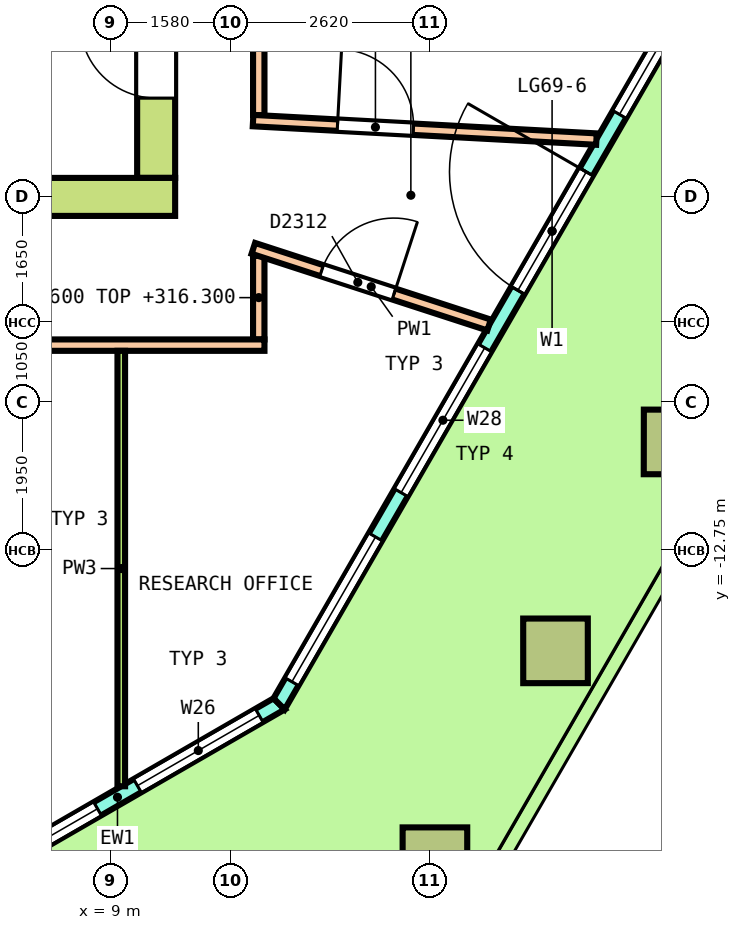
"""IFC4 building model, lengths in metres.
Left out: names, types, materials, properties, quantities, classifications, styles, units other than length and angle.
Written with IfcOpenShell. Run it as: python <this file> out.ifc"""

import sys

from ifc_helpers import new_model, si_unit, direction, frame, frame_2d, origin, origin_2d, place, context, subcontext, project, spatial, polyline, rectangle, outline, extrude, element, fill, save


model = new_model("IFC4")
c1 = context("Model", 3, precision=1e-05, world=origin(), true_north=direction((0.0, 1.0)))
c2 = subcontext(c1, "Body", "Model", "MODEL_VIEW")
j1 = project(units=[si_unit("LENGTHUNIT", "METRE"), si_unit("PLANEANGLEUNIT", "RADIAN")], contexts=[c1])
p1 = place(None, origin())
s1 = spatial("IfcSite", under=j1, at=p1, CompositionType="ELEMENT")
p2 = place(p1, origin())
s2 = spatial("IfcBuilding", under=s1, at=p2, CompositionType="ELEMENT")
p3 = place(p2, frame((0.0, 0.0, 312.6)))
s3 = spatial("IfcBuildingStorey", under=s2, at=p3, CompositionType="ELEMENT", Elevation=312.6)
p4 = place(p3, frame((13.268, -16.82, 0.0), z_axis=(-0.018115165867, -0.031417446337, 0.999342176049), x_axis=(0.499040470376, 0.865819492615, 0.036265894916)))
e1 = element("IfcColumn", 1, at=p4, inside=s3, PredefinedType="COLUMN", context=c2, shape_type="SweptSolid", body=[
    extrude(rectangle(XDim=0.85, YDim=0.85, at=origin_2d()), origin(), (0.0, 0.0, 1.0), 3.652),
])
p5 = place(p3, frame((14.854, -14.072, 0.0), z_axis=(-0.010900423214, -0.018858400897, 0.999762742599), x_axis=(0.499728924135, 0.865907930491, 0.021782063614)))
e2 = element("IfcColumn", 2, at=p5, inside=s3, PredefinedType="COLUMN", context=c2, shape_type="SweptSolid", body=[
    extrude(rectangle(XDim=0.85, YDim=0.85, at=origin_2d()), origin(), (0.0, 0.0, 1.0), 3.651),
])
p6 = place(p3, frame((16.441, -11.324, 0.0), z_axis=(-0.003611945175, -0.00628746012, 0.999973710503), x_axis=(0.499382072477, 0.866351526517, 0.007251081967)))
e3 = element("IfcColumn", 3, at=p6, inside=s3, PredefinedType="COLUMN", context=c2, shape_type="SweptSolid", body=[
    extrude(rectangle(XDim=0.85, YDim=0.85, at=origin_2d()), origin(), (0.0, 0.0, 1.0), 3.65),
])
p7 = place(p3, frame((6.964, -17.226, 0.0), z_axis=(0.0, 0.0, 1.0), x_axis=(0.866050666145, 0.499956241755, 0.0)))
e4 = element("IfcWall", 4, at=p7, inside=s3, PredefinedType="SOLIDWALL", context=c2, shape_type="SweptSolid", body=[
    extrude(outline(polyline([(-0.027, -0.1), (1.214, -0.1), (2.456, -0.1), (3.697, -0.1), (4.938, -0.1), (4.885, 0.1), (3.67, 0.1), (2.456, 0.1), (1.241, 0.1), (0.027, 0.1), (-0.027, -0.1)])), origin(), (0.0, 0.0, 1.0), 3.7),
])
p8 = place(p7, frame((0.303, 0.0, 0.1)))
e5 = element("IfcOpeningElement", 5, at=p8, cuts=e4, PredefinedType="OPENING", context=c2, shape_type="SweptSolid", body=[
    extrude(rectangle(XDim=1.85, YDim=2.9, at=frame_2d((0.925, 1.45))), frame((0.0, 0.11, 0.0), z_axis=(0.0, -1.0, 0.0), x_axis=(1.0, 0.0, 0.0)), (0.0, 0.0, 1.0), 0.22),
])
p9 = place(p7, frame((2.759, 0.0, 0.1)))
e6 = element("IfcOpeningElement", 6, at=p9, cuts=e4, PredefinedType="OPENING", context=c2, shape_type="SweptSolid", body=[
    extrude(rectangle(XDim=1.85, YDim=2.9, at=frame_2d((0.925, 1.45))), frame((0.0, 0.11, 0.0), z_axis=(0.0, -1.0, 0.0), x_axis=(1.0, 0.0, 0.0)), (0.0, 0.0, 1.0), 0.22),
])
p10 = place(p3, frame((11.218, -14.77, 0.0), z_axis=(0.0, 0.0, 1.0), x_axis=(0.499996104244, 0.866027652989, 0.0)))
e7 = element("IfcWall", 7, at=p10, inside=s3, PredefinedType="SOLIDWALL", context=c2, shape_type="SweptSolid", body=[
    extrude(outline(polyline([(-0.027, -0.1), (1.003, -0.1), (2.033, -0.1), (3.063, -0.1), (4.093, -0.1), (5.122, -0.1), (6.152, -0.1), (7.182, -0.1), (8.212, -0.1), (9.242, -0.1), (10.272, -0.1), (11.302, -0.1), (12.331, -0.1), (13.361, -0.1), (14.391, -0.1), (14.337, 0.1), (13.315, 0.1), (12.293, 0.1), (11.271, 0.1), (10.249, 0.1), (9.227, 0.1), (8.204, 0.1), (7.182, 0.1), (6.16, 0.1), (5.138, 0.1), (4.115, 0.1), (3.094, 0.1), (2.071, 0.1), (1.049, 0.1), (0.027, 0.1), (-0.027, -0.1)])), origin(), (0.0, 0.0, 1.0), 3.7),
])
p11 = place(p10, frame((0.336, 0.0, 0.1)))
e8 = element("IfcOpeningElement", 8, at=p11, cuts=e7, PredefinedType="OPENING", context=c2, shape_type="SweptSolid", body=[
    extrude(rectangle(XDim=2.2, YDim=2.9, at=frame_2d((1.1, 1.45))), frame((0.0, 0.11, 0.0), z_axis=(0.0, -1.0, 0.0), x_axis=(1.0, 0.0, 0.0)), (0.0, 0.0, 1.0), 0.22),
])
p12 = place(p10, frame((3.209, 0.0, 0.1)))
e9 = element("IfcOpeningElement", 9, at=p12, cuts=e7, PredefinedType="OPENING", context=c2, shape_type="SweptSolid", body=[
    extrude(rectangle(XDim=2.2, YDim=2.9, at=frame_2d((1.1, 1.45))), frame((0.0, 0.11, 0.0), z_axis=(0.0, -1.0, 0.0), x_axis=(1.0, 0.0, 0.0)), (0.0, 0.0, 1.0), 0.22),
])
p13 = place(p10, frame((6.282, 0.0, 0.0)))
e10 = element("IfcOpeningElement", 10, at=p13, cuts=e7, PredefinedType="OPENING", context=c2, shape_type="SweptSolid", body=[
    extrude(rectangle(XDim=1.8, YDim=2.4, at=frame_2d((0.9, 1.2))), frame((0.0, 0.11, 0.0), z_axis=(0.0, -1.0, 0.0), x_axis=(1.0, 0.0, 0.0)), (0.0, 0.0, 1.0), 0.22),
])
p14 = place(p10, frame((6.282, 0.0, 2.55)))
e11 = element("IfcOpeningElement", 11, at=p14, cuts=e7, PredefinedType="OPENING", context=c2, shape_type="SweptSolid", body=[
    extrude(rectangle(XDim=1.8, YDim=0.45, at=frame_2d((0.9, 0.225))), frame((0.0, 0.11, 0.0), z_axis=(0.0, -1.0, 0.0), x_axis=(1.0, 0.0, 0.0)), (0.0, 0.0, 1.0), 0.22),
])
p15 = place(p10, frame((8.955, 0.0, 0.1)))
e12 = element("IfcOpeningElement", 12, at=p15, cuts=e7, PredefinedType="OPENING", context=c2, shape_type="SweptSolid", body=[
    extrude(rectangle(XDim=2.2, YDim=2.9, at=frame_2d((1.1, 1.45))), frame((0.0, 0.11, 0.0), z_axis=(0.0, -1.0, 0.0), x_axis=(1.0, 0.0, 0.0)), (0.0, 0.0, 1.0), 0.22),
])
p16 = place(p10, frame((11.828, 0.0, 0.1)))
e13 = element("IfcOpeningElement", 13, at=p16, cuts=e7, PredefinedType="OPENING", context=c2, shape_type="SweptSolid", body=[
    extrude(rectangle(XDim=2.2, YDim=2.9, at=frame_2d((1.1, 1.45))), frame((0.0, 0.11, 0.0), z_axis=(0.0, -1.0, 0.0), x_axis=(1.0, 0.0, 0.0)), (0.0, 0.0, 1.0), 0.22),
])
p17 = place(p3, frame((-9.85, -8.1, 0.0), z_axis=(0.0, 0.0, 1.0), x_axis=(1.0, 0.0, 0.0)))
e14 = element("IfcWall", 14, at=p17, inside=s3, PredefinedType="SHEAR", context=c2, shape_type="SweptSolid", body=[
    extrude(rectangle(XDim=19.7, YDim=0.5, at=frame_2d((9.85, 0.0))), origin(), (0.0, 0.0, 1.0), 3.7),
])
p18 = place(p17, frame((11.4, 0.0, 0.0)))
e15 = element("IfcOpeningElement", 15, at=p18, cuts=e14, PredefinedType="OPENING", context=c2, shape_type="SweptSolid", body=[
    extrude(rectangle(XDim=1.2, YDim=2.1, at=frame_2d((0.6, 1.05))), frame((0.0, 0.26, 0.0), z_axis=(0.0, -1.0, 0.0), x_axis=(1.0, 0.0, 0.0)), (0.0, 0.0, 1.0), 0.52),
])
p19 = place(p3, frame((9.6, -7.85, 0.0), z_axis=(0.0, 0.0, 1.0), x_axis=(0.0, 1.0, 0.0)))
e16 = element("IfcWall", 16, at=p19, inside=s3, PredefinedType="SHEAR", context=c2, shape_type="SweptSolid", body=[
    extrude(rectangle(XDim=15.7, YDim=0.5, at=frame_2d((7.85, 0.0))), origin(), (0.0, 0.0, 1.0), 3.7),
])
p20 = place(p19, frame((6.65, 0.0, 0.0)))
e17 = element("IfcOpeningElement", 17, at=p20, cuts=e16, PredefinedType="OPENING", context=c2, shape_type="SweptSolid", body=[
    extrude(rectangle(XDim=2.4, YDim=2.1, at=frame_2d((1.2, 1.05))), frame((0.0, 0.26, 0.0), z_axis=(0.0, -1.0, 0.0), x_axis=(1.0, 0.0, 0.0)), (0.0, 0.0, 1.0), 0.52),
])
p21 = place(p19, frame((13.55, 0.0, 0.0)))
e18 = element("IfcOpeningElement", 18, at=p21, cuts=e16, PredefinedType="OPENING", context=c2, shape_type="SweptSolid", body=[
    extrude(rectangle(XDim=1.2, YDim=2.1, at=frame_2d((0.6, 1.05))), frame((0.0, 0.26, 0.0), z_axis=(0.0, -1.0, 0.0), x_axis=(1.0, 0.0, 0.0)), (0.0, 0.0, 1.0), 0.52),
])
p22 = place(p19, frame((1.05, 0.0, 0.0)))
e19 = element("IfcOpeningElement", 19, at=p22, cuts=e16, PredefinedType="OPENING", context=c2, shape_type="SweptSolid", body=[
    extrude(rectangle(XDim=1.0, YDim=2.1, at=frame_2d((0.5, 1.05))), frame((0.0, 0.26, 0.0), z_axis=(0.0, -1.0, 0.0), x_axis=(1.0, 0.0, 0.0)), (0.0, 0.0, 1.0), 0.52),
])
p23 = place(p3, frame((10.95, -9.975, 0.0), z_axis=(0.0, 0.0, 1.0), x_axis=(0.0, 1.0, 0.0)))
e20 = element("IfcWall", 20, at=p23, inside=s3, PredefinedType="PARTITIONING", context=c2, shape_type="SweptSolid", body=[
    extrude(rectangle(XDim=1.1, YDim=0.15, at=frame_2d((0.55, 0.0))), origin(), (0.0, 0.0, 1.0), 3.7),
])
p24 = place(p3, frame((10.95, -7.025, 0.0), z_axis=(0.0, 0.0, 1.0), x_axis=(0.0, 1.0, 0.0)))
e21 = element("IfcWall", 21, at=p24, inside=s3, PredefinedType="PARTITIONING", context=c2, shape_type="SweptSolid", body=[
    extrude(rectangle(XDim=17.0, YDim=0.15, at=frame_2d((8.5, 0.0))), origin(), (0.0, 0.0, 1.0), 3.05),
])
p25 = place(p24, frame((7.892, 0.0, 0.0)))
e22 = element("IfcOpeningElement", 22, at=p25, cuts=e21, PredefinedType="OPENING", context=c2, shape_type="SweptSolid", body=[
    extrude(rectangle(XDim=1.0, YDim=2.1, at=frame_2d((0.5, 1.05))), frame((0.0, 0.085, 0.0), z_axis=(0.0, -1.0, 0.0), x_axis=(1.0, 0.0, 0.0)), (0.0, 0.0, 1.0), 0.17),
])
p26 = place(p24, frame((11.083, 0.0, 0.0)))
e23 = element("IfcOpeningElement", 23, at=p26, cuts=e21, PredefinedType="OPENING", context=c2, shape_type="SweptSolid", body=[
    extrude(rectangle(XDim=1.0, YDim=2.1, at=frame_2d((0.5, 1.05))), frame((0.0, 0.085, 0.0), z_axis=(0.0, -1.0, 0.0), x_axis=(1.0, 0.0, 0.0)), (0.0, 0.0, 1.0), 0.17),
])
p27 = place(p24, frame((5.527, 0.0, 0.0)))
e24 = element("IfcOpeningElement", 24, at=p27, cuts=e21, PredefinedType="OPENING", context=c2, shape_type="SweptSolid", body=[
    extrude(rectangle(XDim=1.0, YDim=2.1, at=frame_2d((0.5, 1.05))), frame((0.0, 0.085, 0.0), z_axis=(0.0, -1.0, 0.0), x_axis=(1.0, 0.0, 0.0)), (0.0, 0.0, 1.0), 0.17),
])
p28 = place(p3, frame((-10.9, -10.05, 0.0), z_axis=(0.0, 0.0, 1.0), x_axis=(1.0, 0.0, 0.0)))
e25 = element("IfcWall", 25, at=p28, inside=s3, PredefinedType="PARTITIONING", context=c2, shape_type="SweptSolid", body=[
    extrude(rectangle(XDim=21.925, YDim=0.15, at=frame_2d((10.962, 0.0))), origin(), (0.0, 0.0, 1.0), 3.05),
])
p29 = place(p28, frame((1.994, 0.0, 0.0)))
e26 = element("IfcOpeningElement", 26, at=p29, cuts=e25, PredefinedType="OPENING", context=c2, shape_type="SweptSolid", body=[
    extrude(rectangle(XDim=1.0, YDim=2.1, at=frame_2d((0.5, 1.05))), frame((0.0, 0.085, 0.0), z_axis=(0.0, -1.0, 0.0), x_axis=(1.0, 0.0, 0.0)), (0.0, 0.0, 1.0), 0.17),
])
p30 = place(p28, frame((7.178, 0.0, 0.0)))
e27 = element("IfcOpeningElement", 27, at=p30, cuts=e25, PredefinedType="OPENING", context=c2, shape_type="SweptSolid", body=[
    extrude(rectangle(XDim=1.0, YDim=2.1, at=frame_2d((0.5, 1.05))), frame((0.0, 0.085, 0.0), z_axis=(0.0, -1.0, 0.0), x_axis=(1.0, 0.0, 0.0)), (0.0, 0.0, 1.0), 0.17),
])
p31 = place(p28, frame((10.564, 0.0, 0.0)))
e28 = element("IfcOpeningElement", 28, at=p31, cuts=e25, PredefinedType="OPENING", context=c2, shape_type="SweptSolid", body=[
    extrude(rectangle(XDim=1.0, YDim=2.1, at=frame_2d((0.5, 1.05))), frame((0.0, 0.085, 0.0), z_axis=(0.0, -1.0, 0.0), x_axis=(1.0, 0.0, 0.0)), (0.0, 0.0, 1.0), 0.17),
])
p32 = place(p28, frame((15.67, 0.0, 0.0)))
e29 = element("IfcOpeningElement", 29, at=p32, cuts=e25, PredefinedType="OPENING", context=c2, shape_type="SweptSolid", body=[
    extrude(rectangle(XDim=1.0, YDim=2.1, at=frame_2d((0.5, 1.05))), frame((0.0, 0.085, 0.0), z_axis=(0.0, -1.0, 0.0), x_axis=(1.0, 0.0, 0.0)), (0.0, 0.0, 1.0), 0.17),
])
p33 = place(p3, frame((10.879, -8.777, 0.0), z_axis=(0.0, 0.0, 1.0), x_axis=(0.950985647447, -0.309235021222, 0.0)))
e30 = element("IfcWall", 30, at=p33, inside=s3, PredefinedType="PARTITIONING", context=c2, shape_type="SweptSolid", body=[
    extrude(rectangle(XDim=3.261, YDim=0.15, at=frame_2d((1.631, 0.0))), origin(), (0.0, 0.0, 1.0), 3.05),
])
p34 = place(p33, frame((0.945, 0.0, 0.0)))
e31 = element("IfcOpeningElement", 31, at=p34, cuts=e30, PredefinedType="OPENING", context=c2, shape_type="SweptSolid", body=[
    extrude(rectangle(XDim=1.0, YDim=2.1, at=frame_2d((0.5, 1.05))), frame((0.0, 0.085, 0.0), z_axis=(0.0, -1.0, 0.0), x_axis=(1.0, 0.0, 0.0)), (0.0, 0.0, 1.0), 0.17),
])
p35 = place(p3, frame((10.875, -7.096, 0.0), z_axis=(0.0, 0.0, 1.0), x_axis=(0.998551612582, -0.053802202645, 0.0)))
e32 = element("IfcWall", 32, at=p35, inside=s3, PredefinedType="PARTITIONING", context=c2, shape_type="SweptSolid", body=[
    extrude(rectangle(XDim=4.524, YDim=0.15, at=frame_2d((2.262, 0.0))), origin(), (0.0, 0.0, 1.0), 3.05),
])
p36 = place(p35, frame((1.112, 0.0, 0.0)))
e33 = element("IfcOpeningElement", 33, at=p36, cuts=e32, PredefinedType="OPENING", context=c2, shape_type="SweptSolid", body=[
    extrude(rectangle(XDim=1.0, YDim=2.1, at=frame_2d((0.5, 1.05))), frame((0.0, 0.085, 0.0), z_axis=(0.0, -1.0, 0.0), x_axis=(1.0, 0.0, 0.0)), (0.0, 0.0, 1.0), 0.17),
])
p37 = place(p3, frame((9.141, -15.854, 0.0), z_axis=(0.0, 0.0, 1.0), x_axis=(0.0, 1.0, 0.0)))
e34 = element("IfcWall", 34, at=p37, inside=s3, PredefinedType="PARTITIONING", context=c2, shape_type="SweptSolid", body=[
    extrude(rectangle(XDim=5.729, YDim=0.1, at=frame_2d((2.864, 0.0))), origin(), (0.0, 0.0, 1.0), 3.05),
])
p38 = place(p8, origin())
e35 = element("IfcWindow", 35, at=p38, inside=s3, PartitioningType="SINGLE_PANEL", PredefinedType="WINDOW", context=c2, shape_type="SweptSolid", body=[
    extrude(rectangle(XDim=1.85, YDim=2.9, at=frame_2d((0.925, 1.45))), frame((0.0, 0.03, 0.0), z_axis=(0.0, -1.0, 0.0), x_axis=(1.0, 0.0, 0.0)), (0.0, 0.0, 1.0), 0.06),
])
fill(e5, e35)
p39 = place(p9, origin())
e36 = element("IfcWindow", 36, at=p39, inside=s3, PartitioningType="SINGLE_PANEL", PredefinedType="WINDOW", context=c2, shape_type="SweptSolid", body=[
    extrude(rectangle(XDim=1.85, YDim=2.9, at=frame_2d((0.925, 1.45))), frame((0.0, 0.03, 0.0), z_axis=(0.0, -1.0, 0.0), x_axis=(1.0, 0.0, 0.0)), (0.0, 0.0, 1.0), 0.06),
])
fill(e6, e36)
p40 = place(p11, origin())
e37 = element("IfcWindow", 37, at=p40, inside=s3, PartitioningType="SINGLE_PANEL", PredefinedType="WINDOW", context=c2, shape_type="SweptSolid", body=[
    extrude(rectangle(XDim=2.2, YDim=2.9, at=frame_2d((1.1, 1.45))), frame((0.0, 0.03, 0.0), z_axis=(0.0, -1.0, 0.0), x_axis=(1.0, 0.0, 0.0)), (0.0, 0.0, 1.0), 0.06),
])
fill(e8, e37)
p41 = place(p12, origin())
e38 = element("IfcWindow", 38, at=p41, inside=s3, PartitioningType="SINGLE_PANEL", PredefinedType="WINDOW", context=c2, shape_type="SweptSolid", body=[
    extrude(rectangle(XDim=2.2, YDim=2.9, at=frame_2d((1.1, 1.45))), frame((0.0, 0.03, 0.0), z_axis=(0.0, -1.0, 0.0), x_axis=(1.0, 0.0, 0.0)), (0.0, 0.0, 1.0), 0.06),
])
fill(e9, e38)
p42 = place(p13, origin())
e39 = element("IfcDoor", 39, at=p42, inside=s3, OperationType="DOUBLE_DOOR_SINGLE_SWING", PredefinedType="DOOR", context=c2, shape_type="SweptSolid", body=[
    extrude(rectangle(XDim=1.8, YDim=2.4, at=frame_2d((0.9, 1.2))), frame((0.0, 0.025, 0.0), z_axis=(0.0, -1.0, 0.0), x_axis=(1.0, 0.0, 0.0)), (0.0, 0.0, 1.0), 0.05),
])
fill(e10, e39)
p43 = place(p14, origin())
e40 = element("IfcWindow", 40, at=p43, inside=s3, PartitioningType="SINGLE_PANEL", PredefinedType="WINDOW", context=c2, shape_type="SweptSolid", body=[
    extrude(rectangle(XDim=1.8, YDim=0.45, at=frame_2d((0.9, 0.225))), frame((0.0, 0.03, 0.0), z_axis=(0.0, -1.0, 0.0), x_axis=(1.0, 0.0, 0.0)), (0.0, 0.0, 1.0), 0.06),
])
fill(e11, e40)
p44 = place(p15, origin())
e41 = element("IfcWindow", 41, at=p44, inside=s3, PartitioningType="SINGLE_PANEL", PredefinedType="WINDOW", context=c2, shape_type="SweptSolid", body=[
    extrude(rectangle(XDim=2.2, YDim=2.9, at=frame_2d((1.1, 1.45))), frame((0.0, 0.03, 0.0), z_axis=(0.0, -1.0, 0.0), x_axis=(1.0, 0.0, 0.0)), (0.0, 0.0, 1.0), 0.06),
])
fill(e12, e41)
p45 = place(p22, origin())
e42 = element("IfcDoor", 42, at=p45, inside=s3, OperationType="SINGLE_SWING_LEFT", PredefinedType="DOOR", context=c2, shape_type="SweptSolid", body=[
    extrude(rectangle(XDim=1.0, YDim=2.1, at=frame_2d((0.5, 1.05))), frame((0.0, 0.2, 0.0), z_axis=(0.0, -1.0, 0.0), x_axis=(1.0, 0.0, 0.0)), (0.0, 0.0, 1.0), 0.4),
])
fill(e19, e42)
p46 = place(p34, origin())
e43 = element("IfcDoor", 43, at=p46, inside=s3, OperationType="SINGLE_SWING_RIGHT", PredefinedType="DOOR", context=c2, shape_type="SweptSolid", body=[
    extrude(rectangle(XDim=1.0, YDim=2.1, at=frame_2d((0.5, 1.05))), frame((0.0, 0.025, 0.0), z_axis=(0.0, -1.0, 0.0), x_axis=(1.0, 0.0, 0.0)), (0.0, 0.0, 1.0), 0.05),
])
fill(e31, e43)
p47 = place(p36, origin())
e44 = element("IfcDoor", 44, at=p47, inside=s3, OperationType="SINGLE_SWING_RIGHT", PredefinedType="DOOR", context=c2, shape_type="SweptSolid", body=[
    extrude(rectangle(XDim=1.0, YDim=2.1, at=frame_2d((0.5, 1.05))), frame((0.0, 0.025, 0.0), z_axis=(0.0, -1.0, 0.0), x_axis=(1.0, 0.0, 0.0)), (0.0, 0.0, 1.0), 0.05),
])
fill(e33, e44)
save(model, sys.argv[1])
